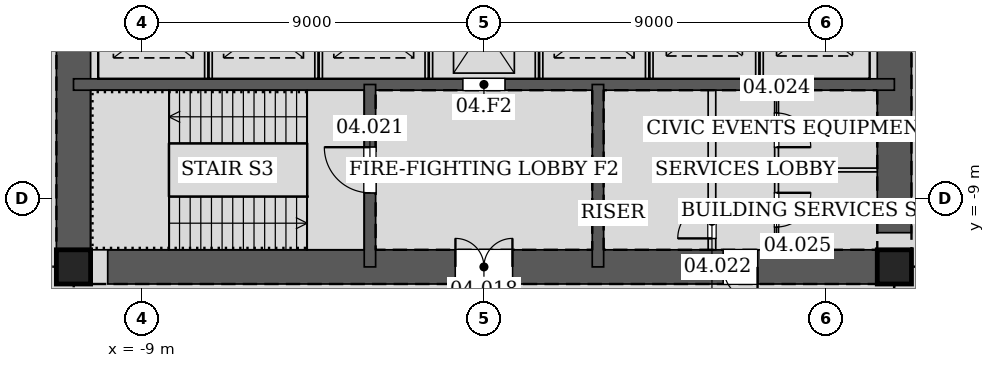
"""IFC4 building model, lengths in metres.
Left out: names, types, materials, properties, quantities, classifications, styles, units other than length and angle.
Written with IfcOpenShell. Run it as: python <this file> out.ifc"""

import sys

from ifc_helpers import new_model, si_unit, direction, frame, frame_2d, origin, origin_2d, place, context, subcontext, project, spatial, rectangle, hollow_rectangle, extrude, element, fill, save


model = new_model("IFC4")
c1 = context("Model", 3, precision=1e-05, world=origin(), true_north=direction((0.0, 1.0)))
c2 = subcontext(c1, "Body", "Model", "MODEL_VIEW")
j1 = project(units=[si_unit("LENGTHUNIT", "METRE"), si_unit("PLANEANGLEUNIT", "RADIAN")], contexts=[c1])
p1 = place(None, origin())
s1 = spatial("IfcSite", under=j1, at=p1, CompositionType="ELEMENT")
p2 = place(p1, origin())
s2 = spatial("IfcBuilding", under=s1, at=p2, CompositionType="ELEMENT")
p3 = place(p2, frame((0.0, 0.0, 24.0)))
s3 = spatial("IfcBuildingStorey", under=s2, at=p3, CompositionType="ELEMENT", Elevation=24.0)
for number, where, z_axis, x_axis in (
    (1, (-10.8, -10.8, 0.0), (0.0, 0.0, 1.0), (1.0, 0.0, 0.0)),
    (2, (10.8, -10.8, 0.0), (0.0, 0.0, 1.0), (1.0, 0.0, 0.0)),
):
    element("IfcColumn", number, at=place(p3, frame(where, z_axis=z_axis, x_axis=x_axis)), inside=s3, PredefinedType="COLUMN", context=c2, shape_type="SweptSolid", body=[
        extrude(hollow_rectangle(XDim=0.9, YDim=0.9, WallThickness=0.06, at=origin_2d()), origin(), (0.0, 0.0, 1.0), 4.8),
    ])
p4 = place(p3, frame((-10.8, -10.8, 0.0), z_axis=(0.0, 0.0, 1.0), x_axis=(1.0, 0.0, 0.0)))
e3 = element("IfcWall", 3, at=p4, inside=s3, PredefinedType="SOLIDWALL", context=c2, shape_type="SweptSolid", body=[
    extrude(rectangle(XDim=21.6, YDim=0.9, at=frame_2d((10.8, 0.0))), origin(), (0.0, 0.0, 1.0), 4.8),
])
p5 = place(p4, frame((10.05, 0.0, 0.0)))
e4 = element("IfcOpeningElement", 4, at=p5, cuts=e3, PredefinedType="OPENING", context=c2, shape_type="SweptSolid", body=[
    extrude(rectangle(XDim=1.5, YDim=2.1, at=frame_2d((0.75, 1.05))), frame((0.0, 0.46, 0.0), z_axis=(0.0, -1.0, 0.0), x_axis=(1.0, 0.0, 0.0)), (0.0, 0.0, 1.0), 0.92),
])
p6 = place(p4, frame((17.1, 0.0, 0.0)))
e5 = element("IfcOpeningElement", 5, at=p6, cuts=e3, PredefinedType="OPENING", context=c2, shape_type="SweptSolid", body=[
    extrude(rectangle(XDim=0.9, YDim=2.1, at=frame_2d((0.45, 1.05))), frame((0.0, 0.46, 0.0), z_axis=(0.0, -1.0, 0.0), x_axis=(1.0, 0.0, 0.0)), (0.0, 0.0, 1.0), 0.92),
])
p7 = place(p3, frame((10.8, -10.8, 0.0), z_axis=(0.0, 0.0, 1.0), x_axis=(0.0, 1.0, 0.0)))
e6 = element("IfcWall", 6, at=p7, inside=s3, PredefinedType="SOLIDWALL", context=c2, shape_type="SweptSolid", body=[
    extrude(rectangle(XDim=21.6, YDim=0.9, at=frame_2d((10.8, 0.0))), origin(), (0.0, 0.0, 1.0), 4.8),
])
p8 = place(p7, frame((11.7, 0.0, 0.0)))
e7 = element("IfcOpeningElement", 7, at=p8, cuts=e6, PredefinedType="OPENING", context=c2, shape_type="SweptSolid", body=[
    extrude(rectangle(XDim=1.2, YDim=2.1, at=frame_2d((0.6, 1.05))), frame((0.0, 0.46, 0.0), z_axis=(0.0, -1.0, 0.0), x_axis=(1.0, 0.0, 0.0)), (0.0, 0.0, 1.0), 0.92),
])
p9 = place(p7, frame((8.7, 0.0, 0.0)))
e8 = element("IfcOpeningElement", 8, at=p9, cuts=e6, PredefinedType="OPENING", context=c2, shape_type="SweptSolid", body=[
    extrude(rectangle(XDim=1.2, YDim=2.1, at=frame_2d((0.6, 1.05))), frame((0.0, 0.46, 0.0), z_axis=(0.0, -1.0, 0.0), x_axis=(1.0, 0.0, 0.0)), (0.0, 0.0, 1.0), 0.92),
])
p10 = place(p3, frame((-10.8, 10.8, 0.0), z_axis=(0.0, 0.0, 1.0), x_axis=(0.0, -1.0, 0.0)))
e9 = element("IfcWall", 9, at=p10, inside=s3, PredefinedType="SOLIDWALL", context=c2, shape_type="SweptSolid", body=[
    extrude(rectangle(XDim=21.6, YDim=0.9, at=frame_2d((10.8, 0.0))), origin(), (0.0, 0.0, 1.0), 4.8),
])
p11 = place(p10, frame((8.7, 0.0, 0.0)))
e10 = element("IfcOpeningElement", 10, at=p11, cuts=e9, PredefinedType="OPENING", context=c2, shape_type="SweptSolid", body=[
    extrude(rectangle(XDim=1.2, YDim=2.1, at=frame_2d((0.6, 1.05))), frame((0.0, 0.46, 0.0), z_axis=(0.0, -1.0, 0.0), x_axis=(1.0, 0.0, 0.0)), (0.0, 0.0, 1.0), 0.92),
])
p12 = place(p10, frame((11.7, 0.0, 0.0)))
e11 = element("IfcOpeningElement", 11, at=p12, cuts=e9, PredefinedType="OPENING", context=c2, shape_type="SweptSolid", body=[
    extrude(rectangle(XDim=1.2, YDim=2.1, at=frame_2d((0.6, 1.05))), frame((0.0, 0.46, 0.0), z_axis=(0.0, -1.0, 0.0), x_axis=(1.0, 0.0, 0.0)), (0.0, 0.0, 1.0), 0.92),
])
p13 = place(p3, frame((-10.8, -6.0, 0.0), z_axis=(0.0, 0.0, 1.0), x_axis=(1.0, 0.0, 0.0)))
e12 = element("IfcWall", 12, at=p13, inside=s3, PredefinedType="SOLIDWALL", context=c2, shape_type="SweptSolid", body=[
    extrude(rectangle(XDim=21.6, YDim=0.3, at=frame_2d((10.8, 0.0))), origin(), (0.0, 0.0, 1.0), 4.8),
])
p14 = place(p13, frame((10.25, 0.0, 0.0)))
e13 = element("IfcOpeningElement", 13, at=p14, cuts=e12, PredefinedType="OPENING", context=c2, shape_type="SweptSolid", body=[
    extrude(rectangle(XDim=1.1, YDim=2.1, at=frame_2d((0.55, 1.05))), frame((0.0, 0.16, 0.0), z_axis=(0.0, -1.0, 0.0), x_axis=(1.0, 0.0, 0.0)), (0.0, 0.0, 1.0), 0.32),
])
p15 = place(p3, frame((-3.0, -6.0, 0.0), z_axis=(0.0, 0.0, 1.0), x_axis=(0.0, -1.0, 0.0)))
e14 = element("IfcWall", 14, at=p15, inside=s3, PredefinedType="SOLIDWALL", context=c2, shape_type="SweptSolid", body=[
    extrude(rectangle(XDim=4.8, YDim=0.3, at=frame_2d((2.4, 0.0))), origin(), (0.0, 0.0, 1.0), 4.8),
])
p16 = place(p15, frame((1.65, 0.0, 0.0)))
e15 = element("IfcOpeningElement", 15, at=p16, cuts=e14, PredefinedType="OPENING", context=c2, shape_type="SweptSolid", body=[
    extrude(rectangle(XDim=1.2, YDim=2.1, at=frame_2d((0.6, 1.05))), frame((0.0, 0.16, 0.0), z_axis=(0.0, -1.0, 0.0), x_axis=(1.0, 0.0, 0.0)), (0.0, 0.0, 1.0), 0.32),
])
p17 = place(p3, frame((3.0, -6.0, 0.0), z_axis=(0.0, 0.0, 1.0), x_axis=(0.0, -1.0, 0.0)))
e16 = element("IfcWall", 16, at=p17, inside=s3, PredefinedType="SOLIDWALL", context=c2, shape_type="SweptSolid", body=[
    extrude(rectangle(XDim=4.8, YDim=0.3, at=frame_2d((2.4, 0.0))), origin(), (0.0, 0.0, 1.0), 4.8),
])
for number, where, z_axis, x_axis in (
    (17, (-7.25, -5.85, 0.0), (0.0, 0.0, 1.0), (0.0, 1.0, 0.0)),
    (18, (-4.35, -5.85, 0.0), (0.0, 0.0, 1.0), (0.0, 1.0, 0.0)),
    (19, (-1.45, -5.85, 0.0), (0.0, 0.0, 1.0), (0.0, 1.0, 0.0)),
    (20, (1.45, -5.85, 0.0), (0.0, 0.0, 1.0), (0.0, 1.0, 0.0)),
    (21, (4.35, -5.85, 0.0), (0.0, 0.0, 1.0), (0.0, 1.0, 0.0)),
    (22, (7.25, -5.85, 0.0), (0.0, 0.0, 1.0), (0.0, 1.0, 0.0)),
):
    element("IfcWall", number, at=place(p3, frame(where, z_axis=z_axis, x_axis=x_axis)), inside=s3, PredefinedType="PARTITIONING", context=c2, shape_type="SweptSolid", body=[
        extrude(rectangle(XDim=2.7, YDim=0.2, at=frame_2d((1.35, 0.0))), origin(), (0.0, 0.0, 1.0), 4.8),
    ])
p18 = place(p3, frame((6.0, -10.35, 0.0), z_axis=(0.0, 0.0, 1.0), x_axis=(0.0, 1.0, 0.0)))
e23 = element("IfcWall", 23, at=p18, inside=s3, PredefinedType="PARTITIONING", context=c2, shape_type="SweptSolid", body=[
    extrude(rectangle(XDim=4.2, YDim=0.2, at=frame_2d((2.1, 0.0))), origin(), (0.0, 0.0, 1.0), 4.5),
])
p19 = place(p18, frame((0.3, 0.0, 0.0)))
e24 = element("IfcOpeningElement", 24, at=p19, cuts=e23, PredefinedType="OPENING", context=c2, shape_type="SweptSolid", body=[
    extrude(rectangle(XDim=0.9, YDim=2.1, at=frame_2d((0.45, 1.05))), frame((0.0, 0.11, 0.0), z_axis=(0.0, -1.0, 0.0), x_axis=(1.0, 0.0, 0.0)), (0.0, 0.0, 1.0), 0.22),
])
p20 = place(p3, frame((7.7, -10.35, 0.0), z_axis=(0.0, 0.0, 1.0), x_axis=(0.0, 1.0, 0.0)))
e25 = element("IfcWall", 25, at=p20, inside=s3, PredefinedType="PARTITIONING", context=c2, shape_type="SweptSolid", body=[
    extrude(rectangle(XDim=4.2, YDim=0.1, at=frame_2d((2.1, 0.0))), origin(), (0.0, 0.0, 1.0), 4.5),
])
p21 = place(p20, frame((2.7, 0.0, 0.0)))
e26 = element("IfcOpeningElement", 26, at=p21, cuts=e25, PredefinedType="OPENING", context=c2, shape_type="SweptSolid", body=[
    extrude(rectangle(XDim=0.9, YDim=2.1, at=frame_2d((0.45, 1.05))), frame((0.0, 0.06, 0.0), z_axis=(0.0, -1.0, 0.0), x_axis=(1.0, 0.0, 0.0)), (0.0, 0.0, 1.0), 0.12),
])
p22 = place(p20, frame((0.6, 0.0, 0.0)))
e27 = element("IfcOpeningElement", 27, at=p22, cuts=e25, PredefinedType="OPENING", context=c2, shape_type="SweptSolid", body=[
    extrude(rectangle(XDim=0.9, YDim=2.1, at=frame_2d((0.45, 1.05))), frame((0.0, 0.06, 0.0), z_axis=(0.0, -1.0, 0.0), x_axis=(1.0, 0.0, 0.0)), (0.0, 0.0, 1.0), 0.12),
])
p23 = place(p3, frame((7.7, -8.25, 0.0), z_axis=(0.0, 0.0, 1.0), x_axis=(1.0, 0.0, 0.0)))
e28 = element("IfcWall", 28, at=p23, inside=s3, PredefinedType="PARTITIONING", context=c2, shape_type="SweptSolid", body=[
    extrude(rectangle(XDim=2.65, YDim=0.1, at=frame_2d((1.325, 0.0))), origin(), (0.0, 0.0, 1.0), 4.5),
])
p24 = place(p5, origin())
e29 = element("IfcDoor", 29, at=p24, inside=s3, OperationType="DOUBLE_DOOR_SINGLE_SWING", PredefinedType="DOOR", context=c2, shape_type="SweptSolid", body=[
    extrude(rectangle(XDim=1.5, YDim=2.1, at=frame_2d((0.75, 1.05))), frame((0.0, 0.025, 0.0), z_axis=(0.0, -1.0, 0.0), x_axis=(1.0, 0.0, 0.0)), (0.0, 0.0, 1.0), 0.05),
])
fill(e4, e29)
p25 = place(p16, frame((1.2, 0.0, 0.0), z_axis=(0.0, 0.0, 1.0), x_axis=(-1.0, 0.0, 0.0)))
e30 = element("IfcDoor", 30, at=p25, inside=s3, OperationType="SINGLE_SWING_RIGHT", PredefinedType="DOOR", context=c2, shape_type="SweptSolid", body=[
    extrude(rectangle(XDim=1.2, YDim=2.1, at=frame_2d((0.6, 1.05))), frame((0.0, 0.025, 0.0), z_axis=(0.0, -1.0, 0.0), x_axis=(1.0, 0.0, 0.0)), (0.0, 0.0, 1.0), 0.05),
])
fill(e15, e30)
p26 = place(p6, frame((0.9, 0.0, 0.0), z_axis=(0.0, 0.0, 1.0), x_axis=(-1.0, 0.0, 0.0)))
e31 = element("IfcDoor", 31, at=p26, inside=s3, OperationType="SINGLE_SWING_LEFT", PredefinedType="DOOR", context=c2, shape_type="SweptSolid", body=[
    extrude(rectangle(XDim=0.9, YDim=2.1, at=frame_2d((0.45, 1.05))), frame((0.0, 0.025, 0.0), z_axis=(0.0, -1.0, 0.0), x_axis=(1.0, 0.0, 0.0)), (0.0, 0.0, 1.0), 0.05),
])
fill(e5, e31)
p27 = place(p19, origin())
e32 = element("IfcDoor", 32, at=p27, inside=s3, OperationType="SINGLE_SWING_LEFT", PredefinedType="DOOR", context=c2, shape_type="SweptSolid", body=[
    extrude(rectangle(XDim=0.9, YDim=2.1, at=frame_2d((0.45, 1.05))), frame((0.0, 0.025, 0.0), z_axis=(0.0, -1.0, 0.0), x_axis=(1.0, 0.0, 0.0)), (0.0, 0.0, 1.0), 0.05),
])
fill(e24, e32)
p28 = place(p21, frame((0.9, 0.0, 0.0), z_axis=(0.0, 0.0, 1.0), x_axis=(-1.0, 0.0, 0.0)))
e33 = element("IfcDoor", 33, at=p28, inside=s3, OperationType="SINGLE_SWING_RIGHT", PredefinedType="DOOR", context=c2, shape_type="SweptSolid", body=[
    extrude(rectangle(XDim=0.9, YDim=2.1, at=frame_2d((0.45, 1.05))), frame((0.0, 0.025, 0.0), z_axis=(0.0, -1.0, 0.0), x_axis=(1.0, 0.0, 0.0)), (0.0, 0.0, 1.0), 0.05),
])
fill(e26, e33)
p29 = place(p22, frame((0.9, 0.0, 0.0), z_axis=(0.0, 0.0, 1.0), x_axis=(-1.0, 0.0, 0.0)))
e34 = element("IfcDoor", 34, at=p29, inside=s3, OperationType="SINGLE_SWING_LEFT", PredefinedType="DOOR", context=c2, shape_type="SweptSolid", body=[
    extrude(rectangle(XDim=0.9, YDim=2.1, at=frame_2d((0.45, 1.05))), frame((0.0, 0.025, 0.0), z_axis=(0.0, -1.0, 0.0), x_axis=(1.0, 0.0, 0.0)), (0.0, 0.0, 1.0), 0.05),
])
fill(e27, e34)
p30 = place(p14, origin())
e35 = element("IfcDoor", 35, at=p30, inside=s3, OperationType="DOUBLE_DOOR_SLIDING", PredefinedType="DOOR", context=c2, shape_type="SweptSolid", body=[
    extrude(rectangle(XDim=1.1, YDim=2.1, at=frame_2d((0.55, 1.05))), frame((0.0, 0.025, 0.0), z_axis=(0.0, -1.0, 0.0), x_axis=(1.0, 0.0, 0.0)), (0.0, 0.0, 1.0), 0.05),
])
fill(e13, e35)
save(model, sys.argv[1])
